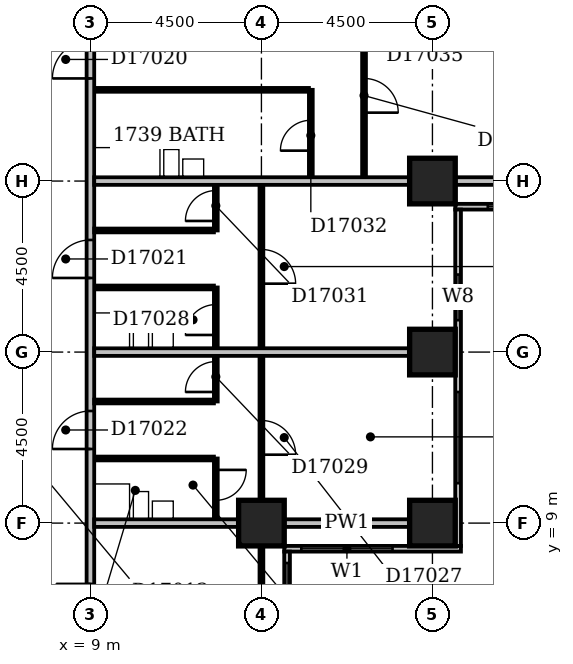
"""IFC4 building model, lengths in metres.
Left out: names, types, materials, properties, quantities, classifications, styles, units other than length and angle.
Written with IfcOpenShell. Run it as: python <this file> out.ifc"""

import sys

from ifc_helpers import new_model, si_unit, direction, frame, frame_2d, origin, origin_2d, place, context, subcontext, project, spatial, rectangle, extrude, element, fill, save


model = new_model("IFC4")
c1 = context("Model", 3, precision=1e-05, world=origin(), true_north=direction((0.0, 1.0)))
c2 = subcontext(c1, "Body", "Model", "MODEL_VIEW")
j1 = project(units=[si_unit("LENGTHUNIT", "METRE"), si_unit("PLANEANGLEUNIT", "RADIAN")], contexts=[c1])
p1 = place(None, origin())
s1 = spatial("IfcSite", under=j1, at=p1, CompositionType="ELEMENT")
p2 = place(p1, origin())
s2 = spatial("IfcBuilding", under=s1, at=p2, CompositionType="ELEMENT")
p3 = place(p2, frame((0.0, 0.0, 72.2)))
s3 = spatial("IfcBuildingStorey", under=s2, at=p3, CompositionType="ELEMENT", Elevation=72.2)
for number, where, z_axis, x_axis in (
    (1, (13.5, 9.0, -0.3), (0.0, 0.0, 1.0), (1.0, 0.0, 0.0)),
    (2, (18.0, 9.0, -0.3), (0.0, 0.0, 1.0), (1.0, 0.0, 0.0)),
    (3, (18.0, 13.5, -0.3), (0.0, 0.0, 1.0), (1.0, 0.0, 0.0)),
    (4, (18.0, 18.0, -0.3), (0.0, 0.0, 1.0), (1.0, 0.0, 0.0)),
):
    element("IfcColumn", number, at=place(p3, frame(where, z_axis=z_axis, x_axis=x_axis)), inside=s3, PredefinedType="COLUMN", context=c2, shape_type="SweptSolid", body=[
        extrude(rectangle(XDim=1.2, YDim=1.2, at=origin_2d()), origin(), (0.0, 0.0, 1.0), 3.6),
    ])
p4 = place(p3, frame((14.175, 3.9, 0.0), z_axis=(0.0, 0.0, 1.0), x_axis=(0.0, 1.0, 0.0)))
e5 = element("IfcWall", 5, at=p4, inside=s3, PredefinedType="STANDARD", context=c2, shape_type="SweptSolid", body=[
    extrude(rectangle(XDim=4.35, YDim=0.15, at=frame_2d((2.175, 0.0))), origin(), (0.0, 0.0, 1.0), 2.7),
])
p5 = place(p4, frame((1.65, 0.0, 0.6)))
e6 = element("IfcOpeningElement", 6, at=p5, cuts=e5, PredefinedType="OPENING", context=c2, shape_type="SweptSolid", body=[
    extrude(rectangle(XDim=2.4, YDim=1.8, at=frame_2d((1.2, 0.9))), frame((0.0, 0.087, 0.0), z_axis=(0.0, -1.0, 0.0), x_axis=(1.0, 0.0, 0.0)), (0.0, 0.0, 1.0), 0.174),
])
p6 = place(p3, frame((14.1, 8.325, 0.0), z_axis=(0.0, 0.0, 1.0), x_axis=(1.0, 0.0, 0.0)))
e7 = element("IfcWall", 7, at=p6, inside=s3, PredefinedType="STANDARD", context=c2, shape_type="SweptSolid", body=[
    extrude(rectangle(XDim=4.65, YDim=0.15, at=frame_2d((2.325, 0.0))), origin(), (0.0, 0.0, 1.0), 2.7),
])
p7 = place(p6, frame((0.45, 0.0, 0.6)))
e8 = element("IfcOpeningElement", 8, at=p7, cuts=e7, PredefinedType="OPENING", context=c2, shape_type="SweptSolid", body=[
    extrude(rectangle(XDim=2.4, YDim=1.8, at=frame_2d((1.2, 0.9))), frame((0.0, 0.087, 0.0), z_axis=(0.0, -1.0, 0.0), x_axis=(1.0, 0.0, 0.0)), (0.0, 0.0, 1.0), 0.174),
])
p8 = place(p3, frame((18.675, 8.4, 0.0), z_axis=(0.0, 0.0, 1.0), x_axis=(0.0, 1.0, 0.0)))
e9 = element("IfcWall", 9, at=p8, inside=s3, PredefinedType="STANDARD", context=c2, shape_type="SweptSolid", body=[
    extrude(rectangle(XDim=8.85, YDim=0.15, at=frame_2d((4.425, 0.0))), origin(), (0.0, 0.0, 1.0), 2.7),
])
p9 = place(p8, frame((1.65, 0.0, 0.6)))
e10 = element("IfcOpeningElement", 10, at=p9, cuts=e9, PredefinedType="OPENING", context=c2, shape_type="SweptSolid", body=[
    extrude(rectangle(XDim=2.4, YDim=1.8, at=frame_2d((1.2, 0.9))), frame((0.0, 0.087, 0.0), z_axis=(0.0, -1.0, 0.0), x_axis=(1.0, 0.0, 0.0)), (0.0, 0.0, 1.0), 0.174),
])
p10 = place(p8, frame((5.939, 0.0, 0.6)))
e11 = element("IfcOpeningElement", 11, at=p10, cuts=e9, PredefinedType="OPENING", context=c2, shape_type="SweptSolid", body=[
    extrude(rectangle(XDim=1.2, YDim=1.8, at=frame_2d((0.6, 0.9))), frame((0.0, 0.087, 0.0), z_axis=(0.0, -1.0, 0.0), x_axis=(1.0, 0.0, 0.0)), (0.0, 0.0, 1.0), 0.174),
])
p11 = place(p3, frame((18.6, 17.325, 0.0), z_axis=(0.0, 0.0, 1.0), x_axis=(1.0, 0.0, 0.0)))
e12 = element("IfcWall", 12, at=p11, inside=s3, PredefinedType="STANDARD", context=c2, shape_type="SweptSolid", body=[
    extrude(rectangle(XDim=4.65, YDim=0.15, at=frame_2d((2.325, 0.0))), origin(), (0.0, 0.0, 1.0), 2.7),
])
p12 = place(p11, frame((0.856, 0.0, 0.6)))
e13 = element("IfcOpeningElement", 13, at=p12, cuts=e12, PredefinedType="OPENING", context=c2, shape_type="SweptSolid", body=[
    extrude(rectangle(XDim=2.1, YDim=1.8, at=frame_2d((1.05, 0.9))), frame((0.0, 0.087, 0.0), z_axis=(0.0, -1.0, 0.0), x_axis=(1.0, 0.0, 0.0)), (0.0, 0.0, 1.0), 0.174),
])
p13 = place(p3, frame((9.0, 5.0, 0.0), z_axis=(0.0, 0.0, 1.0), x_axis=(0.0, 1.0, 0.0)))
e14 = element("IfcWall", 14, at=p13, inside=s3, PredefinedType="PARTITIONING", context=c2, shape_type="SweptSolid", body=[
    extrude(rectangle(XDim=44.5, YDim=0.2, at=frame_2d((22.25, 0.0))), origin(), (0.0, 0.0, 1.0), 3.3),
])
p14 = place(p13, frame((22.3, 0.0, 0.0)))
e15 = element("IfcOpeningElement", 15, at=p14, cuts=e14, PredefinedType="OPENING", context=c2, shape_type="SweptSolid", body=[
    extrude(rectangle(XDim=1.0, YDim=2.1, at=frame_2d((0.5, 1.05))), frame((0.0, 0.112, 0.0), z_axis=(0.0, -1.0, 0.0), x_axis=(1.0, 0.0, 0.0)), (0.0, 0.0, 1.0), 0.224),
])
p15 = place(p13, frame((15.7, 0.0, 0.0)))
e16 = element("IfcOpeningElement", 16, at=p15, cuts=e14, PredefinedType="OPENING", context=c2, shape_type="SweptSolid", body=[
    extrude(rectangle(XDim=1.0, YDim=2.1, at=frame_2d((0.5, 1.05))), frame((0.0, 0.112, 0.0), z_axis=(0.0, -1.0, 0.0), x_axis=(1.0, 0.0, 0.0)), (0.0, 0.0, 1.0), 0.224),
])
p16 = place(p13, frame((10.45, 0.0, 0.0)))
e17 = element("IfcOpeningElement", 17, at=p16, cuts=e14, PredefinedType="OPENING", context=c2, shape_type="SweptSolid", body=[
    extrude(rectangle(XDim=1.0, YDim=2.1, at=frame_2d((0.5, 1.05))), frame((0.0, 0.112, 0.0), z_axis=(0.0, -1.0, 0.0), x_axis=(1.0, 0.0, 0.0)), (0.0, 0.0, 1.0), 0.224),
])
p17 = place(p13, frame((5.95, 0.0, 0.0)))
e18 = element("IfcOpeningElement", 18, at=p17, cuts=e14, PredefinedType="OPENING", context=c2, shape_type="SweptSolid", body=[
    extrude(rectangle(XDim=1.0, YDim=2.1, at=frame_2d((0.5, 1.05))), frame((0.0, 0.112, 0.0), z_axis=(0.0, -1.0, 0.0), x_axis=(1.0, 0.0, 0.0)), (0.0, 0.0, 1.0), 0.224),
])
p18 = place(p13, frame((37.25, 0.0, 0.0)))
e19 = element("IfcOpeningElement", 19, at=p18, cuts=e14, PredefinedType="OPENING", context=c2, shape_type="SweptSolid", body=[
    extrude(rectangle(XDim=0.9, YDim=2.1, at=frame_2d((0.45, 1.05))), frame((0.0, 0.112, 0.0), z_axis=(0.0, -1.0, 0.0), x_axis=(1.0, 0.0, 0.0)), (0.0, 0.0, 1.0), 0.224),
])
p19 = place(p13, frame((1.5, 0.0, 0.0)))
e20 = element("IfcOpeningElement", 20, at=p19, cuts=e14, PredefinedType="OPENING", context=c2, shape_type="SweptSolid", body=[
    extrude(rectangle(XDim=0.9, YDim=2.1, at=frame_2d((0.45, 1.05))), frame((0.0, 0.112, 0.0), z_axis=(0.0, -1.0, 0.0), x_axis=(1.0, 0.0, 0.0)), (0.0, 0.0, 1.0), 0.224),
])
p20 = place(p3, frame((13.5, 5.1, 0.0), z_axis=(0.0, 0.0, 1.0), x_axis=(0.0, 1.0, 0.0)))
e21 = element("IfcWall", 21, at=p20, inside=s3, PredefinedType="PARTITIONING", context=c2, shape_type="SweptSolid", body=[
    extrude(rectangle(XDim=3.3, YDim=0.1, at=frame_2d((1.65, 0.0))), origin(), (0.0, 0.0, 1.0), 2.7),
])
p21 = place(p3, frame((9.1, 9.0, 0.0), z_axis=(0.0, 0.0, 1.0), x_axis=(1.0, 0.0, 0.0)))
e22 = element("IfcWall", 22, at=p21, inside=s3, PredefinedType="PARTITIONING", context=c2, shape_type="SweptSolid", body=[
    extrude(rectangle(XDim=3.8, YDim=0.2, at=frame_2d((1.9, 0.0))), origin(), (0.0, 0.0, 1.0), 3.3),
])
p22 = place(p3, frame((14.1, 9.0, 0.0), z_axis=(0.0, 0.0, 1.0), x_axis=(1.0, 0.0, 0.0)))
e23 = element("IfcWall", 23, at=p22, inside=s3, PredefinedType="PARTITIONING", context=c2, shape_type="SweptSolid", body=[
    extrude(rectangle(XDim=3.3, YDim=0.2, at=frame_2d((1.65, 0.0))), origin(), (0.0, 0.0, 1.0), 2.7),
])
p23 = place(p3, frame((12.3, 9.1, 0.0), z_axis=(0.0, 0.0, 1.0), x_axis=(0.0, 1.0, 0.0)))
e24 = element("IfcWall", 24, at=p23, inside=s3, PredefinedType="PARTITIONING", context=c2, shape_type="SweptSolid", body=[
    extrude(rectangle(XDim=1.6, YDim=0.1, at=frame_2d((0.8, 0.0))), origin(), (0.0, 0.0, 1.0), 3.3),
])
p24 = place(p23, frame((0.5, 0.0, 0.0)))
e25 = element("IfcOpeningElement", 25, at=p24, cuts=e24, PredefinedType="OPENING", context=c2, shape_type="SweptSolid", body=[
    extrude(rectangle(XDim=0.8, YDim=2.1, at=frame_2d((0.4, 1.05))), frame((0.0, 0.062, 0.0), z_axis=(0.0, -1.0, 0.0), x_axis=(1.0, 0.0, 0.0)), (0.0, 0.0, 1.0), 0.124),
])
p25 = place(p3, frame((13.5, 9.6, 0.0), z_axis=(0.0, 0.0, 1.0), x_axis=(0.0, 1.0, 0.0)))
e26 = element("IfcWall", 26, at=p25, inside=s3, PredefinedType="PARTITIONING", context=c2, shape_type="SweptSolid", body=[
    extrude(rectangle(XDim=8.3, YDim=0.1, at=frame_2d((4.15, 0.0))), origin(), (0.0, 0.0, 1.0), 3.3),
])
p26 = place(p25, frame((5.7, 0.0, 0.0)))
e27 = element("IfcOpeningElement", 27, at=p26, cuts=e26, PredefinedType="OPENING", context=c2, shape_type="SweptSolid", body=[
    extrude(rectangle(XDim=0.9, YDim=2.1, at=frame_2d((0.45, 1.05))), frame((0.0, 0.062, 0.0), z_axis=(0.0, -1.0, 0.0), x_axis=(1.0, 0.0, 0.0)), (0.0, 0.0, 1.0), 0.124),
])
p27 = place(p25, frame((1.2, 0.0, 0.0)))
e28 = element("IfcOpeningElement", 28, at=p27, cuts=e26, PredefinedType="OPENING", context=c2, shape_type="SweptSolid", body=[
    extrude(rectangle(XDim=0.9, YDim=2.1, at=frame_2d((0.45, 1.05))), frame((0.0, 0.062, 0.0), z_axis=(0.0, -1.0, 0.0), x_axis=(1.0, 0.0, 0.0)), (0.0, 0.0, 1.0), 0.124),
])
p28 = place(p3, frame((9.1, 10.7, 0.0), z_axis=(0.0, 0.0, 1.0), x_axis=(1.0, 0.0, 0.0)))
e29 = element("IfcWall", 29, at=p28, inside=s3, PredefinedType="PLUMBINGWALL", context=c2, shape_type="SweptSolid", body=[
    extrude(rectangle(XDim=3.15, YDim=0.1, at=frame_2d((1.575, 0.0))), origin(), (0.0, 0.0, 1.0), 3.3),
])
p29 = place(p3, frame((9.1, 12.2, 0.0), z_axis=(0.0, 0.0, 1.0), x_axis=(1.0, 0.0, 0.0)))
e30 = element("IfcWall", 30, at=p29, inside=s3, PredefinedType="PARTITIONING", context=c2, shape_type="SweptSolid", body=[
    extrude(rectangle(XDim=3.15, YDim=0.1, at=frame_2d((1.575, 0.0))), origin(), (0.0, 0.0, 1.0), 3.3),
])
p30 = place(p3, frame((12.3, 12.2, 0.0), z_axis=(0.0, 0.0, 1.0), x_axis=(0.0, 1.0, 0.0)))
e31 = element("IfcWall", 31, at=p30, inside=s3, PredefinedType="PARTITIONING", context=c2, shape_type="SweptSolid", body=[
    extrude(rectangle(XDim=3.0, YDim=0.1, at=frame_2d((1.5, 0.0))), origin(), (0.0, 0.0, 1.0), 3.3),
])
p31 = place(p30, frame((1.75, 0.0, 0.0)))
e32 = element("IfcOpeningElement", 32, at=p31, cuts=e31, PredefinedType="OPENING", context=c2, shape_type="SweptSolid", body=[
    extrude(rectangle(XDim=0.8, YDim=2.1, at=frame_2d((0.4, 1.05))), frame((0.0, 0.062, 0.0), z_axis=(0.0, -1.0, 0.0), x_axis=(1.0, 0.0, 0.0)), (0.0, 0.0, 1.0), 0.124),
])
p32 = place(p30, frame((0.25, 0.0, 0.0)))
e33 = element("IfcOpeningElement", 33, at=p32, cuts=e31, PredefinedType="OPENING", context=c2, shape_type="SweptSolid", body=[
    extrude(rectangle(XDim=0.8, YDim=2.1, at=frame_2d((0.4, 1.05))), frame((0.0, 0.062, 0.0), z_axis=(0.0, -1.0, 0.0), x_axis=(1.0, 0.0, 0.0)), (0.0, 0.0, 1.0), 0.124),
])
p33 = place(p3, frame((9.1, 13.5, 0.0), z_axis=(0.0, 0.0, 1.0), x_axis=(1.0, 0.0, 0.0)))
e34 = element("IfcWall", 34, at=p33, inside=s3, PredefinedType="PARTITIONING", context=c2, shape_type="SweptSolid", body=[
    extrude(rectangle(XDim=8.3, YDim=0.2, at=frame_2d((4.15, 0.0))), origin(), (0.0, 0.0, 1.0), 3.3),
])
p34 = place(p3, frame((9.1, 15.2, 0.0), z_axis=(0.0, 0.0, 1.0), x_axis=(1.0, 0.0, 0.0)))
e35 = element("IfcWall", 35, at=p34, inside=s3, PredefinedType="PLUMBINGWALL", context=c2, shape_type="SweptSolid", body=[
    extrude(rectangle(XDim=3.15, YDim=0.1, at=frame_2d((1.575, 0.0))), origin(), (0.0, 0.0, 1.0), 3.3),
])
p35 = place(p3, frame((9.1, 16.7, 0.0), z_axis=(0.0, 0.0, 1.0), x_axis=(1.0, 0.0, 0.0)))
e36 = element("IfcWall", 36, at=p35, inside=s3, PredefinedType="PARTITIONING", context=c2, shape_type="SweptSolid", body=[
    extrude(rectangle(XDim=3.15, YDim=0.1, at=frame_2d((1.575, 0.0))), origin(), (0.0, 0.0, 1.0), 3.3),
])
p36 = place(p3, frame((12.3, 16.7, 0.0), z_axis=(0.0, 0.0, 1.0), x_axis=(0.0, 1.0, 0.0)))
e37 = element("IfcWall", 37, at=p36, inside=s3, PredefinedType="PARTITIONING", context=c2, shape_type="SweptSolid", body=[
    extrude(rectangle(XDim=1.2, YDim=0.1, at=frame_2d((0.6, 0.0))), origin(), (0.0, 0.0, 1.0), 3.3),
])
p37 = place(p36, frame((0.25, 0.0, 0.0)))
e38 = element("IfcOpeningElement", 38, at=p37, cuts=e37, PredefinedType="OPENING", context=c2, shape_type="SweptSolid", body=[
    extrude(rectangle(XDim=0.8, YDim=2.1, at=frame_2d((0.4, 1.05))), frame((0.0, 0.062, 0.0), z_axis=(0.0, -1.0, 0.0), x_axis=(1.0, 0.0, 0.0)), (0.0, 0.0, 1.0), 0.124),
])
p38 = place(p3, frame((9.1, 18.0, 0.0), z_axis=(0.0, 0.0, 1.0), x_axis=(1.0, 0.0, 0.0)))
e39 = element("IfcWall", 39, at=p38, inside=s3, PredefinedType="PARTITIONING", context=c2, shape_type="SweptSolid", body=[
    extrude(rectangle(XDim=8.3, YDim=0.2, at=frame_2d((4.15, 0.0))), origin(), (0.0, 0.0, 1.0), 2.6),
])
p39 = place(p3, frame((18.6, 18.0, 0.0), z_axis=(0.0, 0.0, 1.0), x_axis=(1.0, 0.0, 0.0)))
e40 = element("IfcWall", 40, at=p39, inside=s3, PredefinedType="PARTITIONING", context=c2, shape_type="SweptSolid", body=[
    extrude(rectangle(XDim=3.3, YDim=0.2, at=frame_2d((1.65, 0.0))), origin(), (0.0, 0.0, 1.0), 2.7),
])
p40 = place(p3, frame((14.8, 18.1, 0.0), z_axis=(0.0, 0.0, 1.0), x_axis=(0.0, 1.0, 0.0)))
e41 = element("IfcWall", 41, at=p40, inside=s3, PredefinedType="PARTITIONING", context=c2, shape_type="SweptSolid", body=[
    extrude(rectangle(XDim=2.3, YDim=0.1, at=frame_2d((1.15, 0.0))), origin(), (0.0, 0.0, 1.0), 3.3),
])
p41 = place(p40, frame((0.7, 0.0, 0.0)))
e42 = element("IfcOpeningElement", 42, at=p41, cuts=e41, PredefinedType="OPENING", context=c2, shape_type="SweptSolid", body=[
    extrude(rectangle(XDim=0.8, YDim=2.1, at=frame_2d((0.4, 1.05))), frame((0.0, 0.062, 0.0), z_axis=(0.0, -1.0, 0.0), x_axis=(1.0, 0.0, 0.0)), (0.0, 0.0, 1.0), 0.124),
])
p42 = place(p3, frame((16.2, 18.1, 0.0), z_axis=(0.0, 0.0, 1.0), x_axis=(0.0, 1.0, 0.0)))
e43 = element("IfcWall", 43, at=p42, inside=s3, PredefinedType="PARTITIONING", context=c2, shape_type="SweptSolid", body=[
    extrude(rectangle(XDim=8.8, YDim=0.1, at=frame_2d((4.4, 0.0))), origin(), (0.0, 0.0, 1.0), 3.3),
])
p43 = place(p42, frame((1.7, 0.0, 0.0)))
e44 = element("IfcOpeningElement", 44, at=p43, cuts=e43, PredefinedType="OPENING", context=c2, shape_type="SweptSolid", body=[
    extrude(rectangle(XDim=0.9, YDim=2.1, at=frame_2d((0.45, 1.05))), frame((0.0, 0.062, 0.0), z_axis=(0.0, -1.0, 0.0), x_axis=(1.0, 0.0, 0.0)), (0.0, 0.0, 1.0), 0.124),
])
p44 = place(p42, frame((6.2, 0.0, 0.0)))
e45 = element("IfcOpeningElement", 45, at=p44, cuts=e43, PredefinedType="OPENING", context=c2, shape_type="SweptSolid", body=[
    extrude(rectangle(XDim=0.9, YDim=2.1, at=frame_2d((0.45, 1.05))), frame((0.0, 0.062, 0.0), z_axis=(0.0, -1.0, 0.0), x_axis=(1.0, 0.0, 0.0)), (0.0, 0.0, 1.0), 0.124),
])
p45 = place(p3, frame((9.1, 20.4, 0.0), z_axis=(0.0, 0.0, 1.0), x_axis=(1.0, 0.0, 0.0)))
e46 = element("IfcWall", 46, at=p45, inside=s3, PredefinedType="PLUMBINGWALL", context=c2, shape_type="SweptSolid", body=[
    extrude(rectangle(XDim=5.65, YDim=0.1, at=frame_2d((2.825, 0.0))), origin(), (0.0, 0.0, 1.0), 3.3),
])
p46 = place(p5, origin())
e47 = element("IfcWindow", 47, at=p46, inside=s3, PartitioningType="SINGLE_PANEL", PredefinedType="WINDOW", context=c2, shape_type="SweptSolid", body=[
    extrude(rectangle(XDim=2.4, YDim=1.8, at=frame_2d((1.2, 0.9))), frame((0.0, 0.03, 0.0), z_axis=(0.0, -1.0, 0.0), x_axis=(1.0, 0.0, 0.0)), (0.0, 0.0, 1.0), 0.06),
])
fill(e6, e47)
p47 = place(p7, origin())
e48 = element("IfcWindow", 48, at=p47, inside=s3, PartitioningType="SINGLE_PANEL", PredefinedType="WINDOW", context=c2, shape_type="SweptSolid", body=[
    extrude(rectangle(XDim=2.4, YDim=1.8, at=frame_2d((1.2, 0.9))), frame((0.0, 0.03, 0.0), z_axis=(0.0, -1.0, 0.0), x_axis=(1.0, 0.0, 0.0)), (0.0, 0.0, 1.0), 0.06),
])
fill(e8, e48)
p48 = place(p9, origin())
e49 = element("IfcWindow", 49, at=p48, inside=s3, PartitioningType="SINGLE_PANEL", PredefinedType="WINDOW", context=c2, shape_type="SweptSolid", body=[
    extrude(rectangle(XDim=2.4, YDim=1.8, at=frame_2d((1.2, 0.9))), frame((0.0, 0.03, 0.0), z_axis=(0.0, -1.0, 0.0), x_axis=(1.0, 0.0, 0.0)), (0.0, 0.0, 1.0), 0.06),
])
fill(e10, e49)
p49 = place(p10, origin())
e50 = element("IfcWindow", 50, at=p49, inside=s3, PartitioningType="SINGLE_PANEL", PredefinedType="WINDOW", context=c2, shape_type="SweptSolid", body=[
    extrude(rectangle(XDim=1.2, YDim=1.8, at=frame_2d((0.6, 0.9))), frame((0.0, 0.03, 0.0), z_axis=(0.0, -1.0, 0.0), x_axis=(1.0, 0.0, 0.0)), (0.0, 0.0, 1.0), 0.06),
])
fill(e11, e50)
p50 = place(p12, origin())
e51 = element("IfcWindow", 51, at=p50, inside=s3, PartitioningType="SINGLE_PANEL", PredefinedType="WINDOW", context=c2, shape_type="SweptSolid", body=[
    extrude(rectangle(XDim=2.1, YDim=1.8, at=frame_2d((1.05, 0.9))), frame((0.0, 0.03, 0.0), z_axis=(0.0, -1.0, 0.0), x_axis=(1.0, 0.0, 0.0)), (0.0, 0.0, 1.0), 0.06),
])
fill(e13, e51)
p51 = place(p15, origin())
e52 = element("IfcDoor", 52, at=p51, inside=s3, OperationType="SINGLE_SWING_LEFT", PredefinedType="DOOR", context=c2, shape_type="SweptSolid", body=[
    extrude(rectangle(XDim=1.0, YDim=2.1, at=frame_2d((0.5, 1.05))), frame((0.0, 0.025, 0.0), z_axis=(0.0, -1.0, 0.0), x_axis=(1.0, 0.0, 0.0)), (0.0, 0.0, 1.0), 0.05),
])
fill(e16, e52)
p52 = place(p16, origin())
e53 = element("IfcDoor", 53, at=p52, inside=s3, OperationType="SINGLE_SWING_LEFT", PredefinedType="DOOR", context=c2, shape_type="SweptSolid", body=[
    extrude(rectangle(XDim=1.0, YDim=2.1, at=frame_2d((0.5, 1.05))), frame((0.0, 0.025, 0.0), z_axis=(0.0, -1.0, 0.0), x_axis=(1.0, 0.0, 0.0)), (0.0, 0.0, 1.0), 0.05),
])
fill(e17, e53)
p53 = place(p17, origin())
e54 = element("IfcDoor", 54, at=p53, inside=s3, OperationType="SINGLE_SWING_LEFT", PredefinedType="DOOR", context=c2, shape_type="SweptSolid", body=[
    extrude(rectangle(XDim=1.0, YDim=2.1, at=frame_2d((0.5, 1.05))), frame((0.0, 0.025, 0.0), z_axis=(0.0, -1.0, 0.0), x_axis=(1.0, 0.0, 0.0)), (0.0, 0.0, 1.0), 0.05),
])
fill(e18, e54)
p54 = place(p24, origin())
e55 = element("IfcDoor", 55, at=p54, inside=s3, OperationType="SINGLE_SWING_RIGHT", PredefinedType="DOOR", context=c2, shape_type="SweptSolid", body=[
    extrude(rectangle(XDim=0.8, YDim=2.1, at=frame_2d((0.4, 1.05))), frame((0.0, 0.025, 0.0), z_axis=(0.0, -1.0, 0.0), x_axis=(1.0, 0.0, 0.0)), (0.0, 0.0, 1.0), 0.05),
])
fill(e25, e55)
p55 = place(p26, frame((0.9, 0.0, 0.0), z_axis=(0.0, 0.0, 1.0), x_axis=(-1.0, 0.0, 0.0)))
e56 = element("IfcDoor", 56, at=p55, inside=s3, OperationType="SINGLE_SWING_RIGHT", PredefinedType="DOOR", context=c2, shape_type="SweptSolid", body=[
    extrude(rectangle(XDim=0.9, YDim=2.1, at=frame_2d((0.45, 1.05))), frame((0.0, 0.025, 0.0), z_axis=(0.0, -1.0, 0.0), x_axis=(1.0, 0.0, 0.0)), (0.0, 0.0, 1.0), 0.05),
])
fill(e27, e56)
p56 = place(p27, frame((0.9, 0.0, 0.0), z_axis=(0.0, 0.0, 1.0), x_axis=(-1.0, 0.0, 0.0)))
e57 = element("IfcDoor", 57, at=p56, inside=s3, OperationType="SINGLE_SWING_RIGHT", PredefinedType="DOOR", context=c2, shape_type="SweptSolid", body=[
    extrude(rectangle(XDim=0.9, YDim=2.1, at=frame_2d((0.45, 1.05))), frame((0.0, 0.025, 0.0), z_axis=(0.0, -1.0, 0.0), x_axis=(1.0, 0.0, 0.0)), (0.0, 0.0, 1.0), 0.05),
])
fill(e28, e57)
p57 = place(p31, origin())
e58 = element("IfcDoor", 58, at=p57, inside=s3, OperationType="SINGLE_SWING_LEFT", PredefinedType="DOOR", context=c2, shape_type="SweptSolid", body=[
    extrude(rectangle(XDim=0.8, YDim=2.1, at=frame_2d((0.4, 1.05))), frame((0.0, 0.025, 0.0), z_axis=(0.0, -1.0, 0.0), x_axis=(1.0, 0.0, 0.0)), (0.0, 0.0, 1.0), 0.05),
])
fill(e32, e58)
p58 = place(p32, origin())
e59 = element("IfcDoor", 59, at=p58, inside=s3, OperationType="SINGLE_SWING_LEFT", PredefinedType="DOOR", context=c2, shape_type="SweptSolid", body=[
    extrude(rectangle(XDim=0.8, YDim=2.1, at=frame_2d((0.4, 1.05))), frame((0.0, 0.025, 0.0), z_axis=(0.0, -1.0, 0.0), x_axis=(1.0, 0.0, 0.0)), (0.0, 0.0, 1.0), 0.05),
])
fill(e33, e59)
p59 = place(p37, origin())
e60 = element("IfcDoor", 60, at=p59, inside=s3, OperationType="SINGLE_SWING_LEFT", PredefinedType="DOOR", context=c2, shape_type="SweptSolid", body=[
    extrude(rectangle(XDim=0.8, YDim=2.1, at=frame_2d((0.4, 1.05))), frame((0.0, 0.025, 0.0), z_axis=(0.0, -1.0, 0.0), x_axis=(1.0, 0.0, 0.0)), (0.0, 0.0, 1.0), 0.05),
])
fill(e38, e60)
p60 = place(p41, origin())
e61 = element("IfcDoor", 61, at=p60, inside=s3, OperationType="SINGLE_SWING_LEFT", PredefinedType="DOOR", context=c2, shape_type="SweptSolid", body=[
    extrude(rectangle(XDim=0.8, YDim=2.1, at=frame_2d((0.4, 1.05))), frame((0.0, 0.025, 0.0), z_axis=(0.0, -1.0, 0.0), x_axis=(1.0, 0.0, 0.0)), (0.0, 0.0, 1.0), 0.05),
])
fill(e42, e61)
p61 = place(p43, frame((0.9, 0.0, 0.0), z_axis=(0.0, 0.0, 1.0), x_axis=(-1.0, 0.0, 0.0)))
e62 = element("IfcDoor", 62, at=p61, inside=s3, OperationType="SINGLE_SWING_RIGHT", PredefinedType="DOOR", context=c2, shape_type="SweptSolid", body=[
    extrude(rectangle(XDim=0.9, YDim=2.1, at=frame_2d((0.45, 1.05))), frame((0.0, 0.025, 0.0), z_axis=(0.0, -1.0, 0.0), x_axis=(1.0, 0.0, 0.0)), (0.0, 0.0, 1.0), 0.05),
])
fill(e44, e62)
save(model, sys.argv[1])
